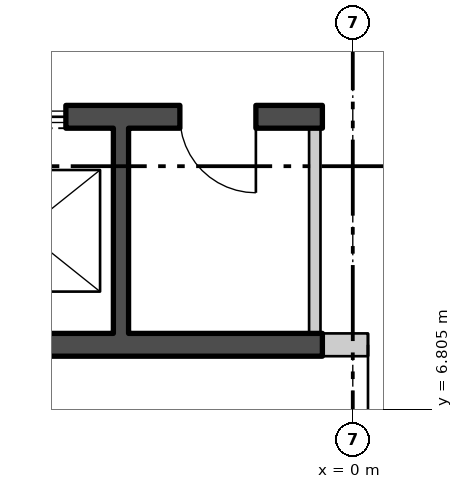
"""IFC4 building model, lengths in metres.
Left out: names, types, materials, properties, quantities, classifications, styles, units other than length and angle.
Written with IfcOpenShell. Run it as: python <this file> out.ifc"""

import sys

from ifc_helpers import new_model, si_unit, direction, frame, frame_2d, origin, place, context, subcontext, project, spatial, polyline, rectangle, outline, extrude, element, fill, save


model = new_model("IFC4")
c1 = context("Model", 3, precision=1e-05, world=origin(), true_north=direction((0.0, 1.0)))
c2 = subcontext(c1, "Body", "Model", "MODEL_VIEW")
j1 = project(units=[si_unit("LENGTHUNIT", "METRE"), si_unit("PLANEANGLEUNIT", "RADIAN")], contexts=[c1])
p1 = place(None, origin())
s1 = spatial("IfcSite", under=j1, at=p1, CompositionType="ELEMENT")
p2 = place(p1, origin())
s2 = spatial("IfcBuilding", under=s1, at=p2, CompositionType="ELEMENT")
p3 = place(p2, frame((0.0, 0.0, 312.6)))
s3 = spatial("IfcBuildingStorey", under=s2, at=p3, CompositionType="ELEMENT", Elevation=312.6)
p4 = place(p3, frame((-24.985, 16.303, -0.18), z_axis=(0.0, 0.0, 1.0), x_axis=(0.500000141277, -0.866025322218, 0.0)))
e1 = element("IfcWall", 1, at=p4, inside=s3, PredefinedType="SOLIDWALL", context=c2, shape_type="SweptSolid", body=[
    extrude(outline(polyline([(-0.13, -0.225), (45.86, -0.225), (45.6, 0.225), (0.13, 0.225), (-0.13, -0.225)])), origin(), (0.0, 0.0, 1.0), 3.98),
])
p5 = place(p4, frame((1.424, 0.0, 1.08)))
e2 = element("IfcOpeningElement", 2, at=p5, cuts=e1, PredefinedType="OPENING", context=c2, shape_type="SweptSolid", body=[
    extrude(rectangle(XDim=2.4, YDim=2.3, at=frame_2d((1.2, 1.15))), frame((0.0, 0.235, 0.0), z_axis=(0.0, -1.0, 0.0), x_axis=(1.0, 0.0, 0.0)), (0.0, 0.0, 1.0), 0.47),
])
p6 = place(p4, frame((5.892, 0.0, 1.08)))
e3 = element("IfcOpeningElement", 3, at=p6, cuts=e1, PredefinedType="OPENING", context=c2, shape_type="SweptSolid", body=[
    extrude(rectangle(XDim=2.4, YDim=2.3, at=frame_2d((1.2, 1.15))), frame((0.0, 0.235, 0.0), z_axis=(0.0, -1.0, 0.0), x_axis=(1.0, 0.0, 0.0)), (0.0, 0.0, 1.0), 0.47),
])
p7 = place(p4, frame((10.399, 0.0, 1.08)))
e4 = element("IfcOpeningElement", 4, at=p7, cuts=e1, PredefinedType="OPENING", context=c2, shape_type="SweptSolid", body=[
    extrude(rectangle(XDim=2.4, YDim=2.3, at=frame_2d((1.2, 1.15))), frame((0.0, 0.235, 0.0), z_axis=(0.0, -1.0, 0.0), x_axis=(1.0, 0.0, 0.0)), (0.0, 0.0, 1.0), 0.47),
])
p8 = place(p4, frame((14.905, 0.0, 1.08)))
e5 = element("IfcOpeningElement", 5, at=p8, cuts=e1, PredefinedType="OPENING", context=c2, shape_type="SweptSolid", body=[
    extrude(rectangle(XDim=2.4, YDim=2.3, at=frame_2d((1.2, 1.15))), frame((0.0, 0.235, 0.0), z_axis=(0.0, -1.0, 0.0), x_axis=(1.0, 0.0, 0.0)), (0.0, 0.0, 1.0), 0.47),
])
p9 = place(p4, frame((19.412, 0.0, 1.08)))
e6 = element("IfcOpeningElement", 6, at=p9, cuts=e1, PredefinedType="OPENING", context=c2, shape_type="SweptSolid", body=[
    extrude(rectangle(XDim=2.4, YDim=2.3, at=frame_2d((1.2, 1.15))), frame((0.0, 0.235, 0.0), z_axis=(0.0, -1.0, 0.0), x_axis=(1.0, 0.0, 0.0)), (0.0, 0.0, 1.0), 0.47),
])
p10 = place(p4, frame((23.918, 0.0, 1.08)))
e7 = element("IfcOpeningElement", 7, at=p10, cuts=e1, PredefinedType="OPENING", context=c2, shape_type="SweptSolid", body=[
    extrude(rectangle(XDim=2.4, YDim=2.3, at=frame_2d((1.2, 1.15))), frame((0.0, 0.235, 0.0), z_axis=(0.0, -1.0, 0.0), x_axis=(1.0, 0.0, 0.0)), (0.0, 0.0, 1.0), 0.47),
])
p11 = place(p4, frame((28.425, 0.0, 1.08)))
e8 = element("IfcOpeningElement", 8, at=p11, cuts=e1, PredefinedType="OPENING", context=c2, shape_type="SweptSolid", body=[
    extrude(rectangle(XDim=2.4, YDim=2.3, at=frame_2d((1.2, 1.15))), frame((0.0, 0.235, 0.0), z_axis=(0.0, -1.0, 0.0), x_axis=(1.0, 0.0, 0.0)), (0.0, 0.0, 1.0), 0.47),
])
p12 = place(p4, frame((37.438, 0.0, 1.08)))
e9 = element("IfcOpeningElement", 9, at=p12, cuts=e1, PredefinedType="OPENING", context=c2, shape_type="SweptSolid", body=[
    extrude(rectangle(XDim=2.4, YDim=2.3, at=frame_2d((1.2, 1.15))), frame((0.0, 0.235, 0.0), z_axis=(0.0, -1.0, 0.0), x_axis=(1.0, 0.0, 0.0)), (0.0, 0.0, 1.0), 0.47),
])
p13 = place(p4, frame((41.907, 0.0, 1.08)))
e10 = element("IfcOpeningElement", 10, at=p13, cuts=e1, PredefinedType="OPENING", context=c2, shape_type="SweptSolid", body=[
    extrude(rectangle(XDim=2.4, YDim=2.3, at=frame_2d((1.2, 1.15))), frame((0.0, 0.235, 0.0), z_axis=(0.0, -1.0, 0.0), x_axis=(1.0, 0.0, 0.0)), (0.0, 0.0, 1.0), 0.47),
])
p14 = place(p3, frame((-10.7, 10.65, 0.0), z_axis=(0.0, 0.0, 1.0), x_axis=(1.0, 0.0, 0.0)))
e11 = element("IfcWall", 11, at=p14, inside=s3, PredefinedType="SHEAR", context=c2, shape_type="SweptSolid", body=[
    extrude(rectangle(XDim=10.3, YDim=0.3, at=frame_2d((5.15, 0.0))), origin(), (0.0, 0.0, 1.0), 4.0),
])
p15 = place(p14, frame((0.675, 0.0, 0.0)))
e12 = element("IfcOpeningElement", 12, at=p15, cuts=e11, PredefinedType="OPENING", context=c2, shape_type="SweptSolid", body=[
    extrude(rectangle(XDim=1.1, YDim=2.1, at=frame_2d((0.55, 1.05))), frame((0.0, 0.16, 0.0), z_axis=(0.0, -1.0, 0.0), x_axis=(1.0, 0.0, 0.0)), (0.0, 0.0, 1.0), 0.32),
])
p16 = place(p14, frame((3.275, 0.0, 0.0)))
e13 = element("IfcOpeningElement", 13, at=p16, cuts=e11, PredefinedType="OPENING", context=c2, shape_type="SweptSolid", body=[
    extrude(rectangle(XDim=1.1, YDim=2.1, at=frame_2d((0.55, 1.05))), frame((0.0, 0.16, 0.0), z_axis=(0.0, -1.0, 0.0), x_axis=(1.0, 0.0, 0.0)), (0.0, 0.0, 1.0), 0.32),
])
p17 = place(p14, frame((5.825, 0.0, 0.0)))
e14 = element("IfcOpeningElement", 14, at=p17, cuts=e11, PredefinedType="OPENING", context=c2, shape_type="SweptSolid", body=[
    extrude(rectangle(XDim=1.1, YDim=2.1, at=frame_2d((0.55, 1.05))), frame((0.0, 0.16, 0.0), z_axis=(0.0, -1.0, 0.0), x_axis=(1.0, 0.0, 0.0)), (0.0, 0.0, 1.0), 0.32),
])
p18 = place(p14, frame((8.425, 0.0, 0.0)))
e15 = element("IfcOpeningElement", 15, at=p18, cuts=e11, PredefinedType="OPENING", context=c2, shape_type="SweptSolid", body=[
    extrude(rectangle(XDim=1.0, YDim=2.1, at=frame_2d((0.5, 1.05))), frame((0.0, 0.16, 0.0), z_axis=(0.0, -1.0, 0.0), x_axis=(1.0, 0.0, 0.0)), (0.0, 0.0, 1.0), 0.32),
])
p19 = place(p3, frame((-10.7, 7.65, 0.0), z_axis=(0.0, 0.0, 1.0), x_axis=(1.0, 0.0, 0.0)))
e16 = element("IfcWall", 16, at=p19, inside=s3, PredefinedType="SHEAR", context=c2, shape_type="SweptSolid", body=[
    extrude(rectangle(XDim=10.3, YDim=0.3, at=frame_2d((5.15, 0.0))), origin(), (0.0, 0.0, 1.0), 4.0),
])
p20 = place(p3, frame((-3.05, 7.8, 0.0), z_axis=(0.0, 0.0, 1.0), x_axis=(0.0, 1.0, 0.0)))
e17 = element("IfcWall", 17, at=p20, inside=s3, PredefinedType="SHEAR", context=c2, shape_type="SweptSolid", body=[
    extrude(rectangle(XDim=2.7, YDim=0.2, at=frame_2d((1.35, 0.0))), origin(), (0.0, 0.0, 1.0), 4.0),
])
p21 = place(p3, frame((-0.5, 7.8, 0.0), z_axis=(0.0, 0.0, 1.0), x_axis=(0.0, 1.0, 0.0)))
e18 = element("IfcWall", 18, at=p21, inside=s3, PredefinedType="PARTITIONING", context=c2, shape_type="SweptSolid", body=[
    extrude(rectangle(XDim=2.7, YDim=0.15, at=frame_2d((1.35, 0.0))), origin(), (0.0, 0.0, 1.0), 4.0),
])
p22 = place(p3, frame((-0.4, 7.65, 0.0), z_axis=(0.0, 0.0, 1.0), x_axis=(1.0, 0.0, 0.0)))
e19 = element("IfcWall", 19, at=p22, inside=s3, PredefinedType="PARTITIONING", context=c2, shape_type="SweptSolid", body=[
    extrude(rectangle(XDim=3.0, YDim=0.3, at=frame_2d((1.5, 0.0))), origin(), (0.0, 0.0, 1.0), 4.0),
])
p23 = place(p22, frame((0.6, 0.0, 0.0)))
e20 = element("IfcOpeningElement", 20, at=p23, cuts=e19, PredefinedType="OPENING", context=c2, shape_type="SweptSolid", body=[
    extrude(rectangle(XDim=1.8, YDim=2.4, at=frame_2d((0.9, 1.2))), frame((0.0, 0.16, 0.0), z_axis=(0.0, -1.0, 0.0), x_axis=(1.0, 0.0, 0.0)), (0.0, 0.0, 1.0), 0.32),
])
p24 = place(p17, origin())
e21 = element("IfcDoor", 21, at=p24, inside=s3, OperationType="SLIDING_TO_LEFT", PredefinedType="DOOR", context=c2, shape_type="SweptSolid", body=[
    extrude(rectangle(XDim=1.1, YDim=2.1, at=frame_2d((0.55, 1.05))), frame((0.0, 0.025, 0.0), z_axis=(0.0, -1.0, 0.0), x_axis=(1.0, 0.0, 0.0)), (0.0, 0.0, 1.0), 0.05),
])
fill(e14, e21)
p25 = place(p18, origin())
e22 = element("IfcDoor", 22, at=p25, inside=s3, OperationType="SINGLE_SWING_RIGHT", PredefinedType="DOOR", context=c2, shape_type="SweptSolid", body=[
    extrude(rectangle(XDim=1.0, YDim=2.1, at=frame_2d((0.5, 1.05))), frame((0.0, 0.025, 0.0), z_axis=(0.0, -1.0, 0.0), x_axis=(1.0, 0.0, 0.0)), (0.0, 0.0, 1.0), 0.05),
])
fill(e15, e22)
p26 = place(p23, origin())
e23 = element("IfcDoor", 23, at=p26, inside=s3, OperationType="DOUBLE_DOOR_SINGLE_SWING", PredefinedType="DOOR", context=c2, shape_type="SweptSolid", body=[
    extrude(rectangle(XDim=1.8, YDim=2.4, at=frame_2d((0.9, 1.2))), frame((0.0, 0.025, 0.0), z_axis=(0.0, -1.0, 0.0), x_axis=(1.0, 0.0, 0.0)), (0.0, 0.0, 1.0), 0.05),
])
fill(e20, e23)
save(model, sys.argv[1])
